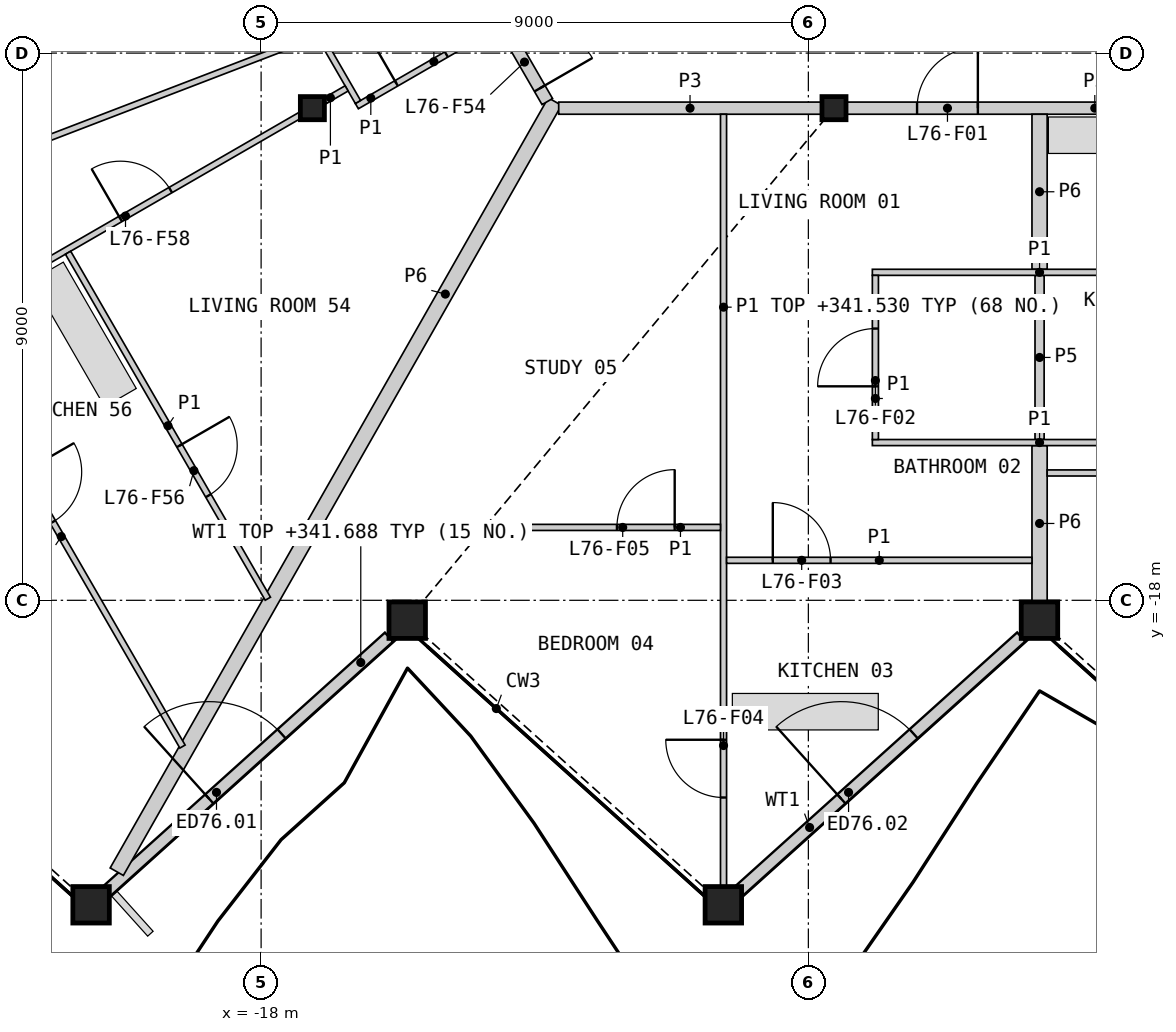
"""IFC4 building model, lengths in metres.
Left out: names, types, materials, properties, quantities, classifications, styles, units other than length and angle.
Written with IfcOpenShell. Run it as: python <this file> out.ifc"""

import sys

from ifc_helpers import new_model, si_unit, direction, frame, frame_2d, origin, origin_2d, place, context, subcontext, project, spatial, rectangle, hollow_rectangle, i_section, extrude, element, fill, save


model = new_model("IFC4")
c1 = context("Model", 3, precision=1e-05, world=origin(), true_north=direction((0.0, 1.0)))
c2 = subcontext(c1, "Body", "Model", "MODEL_VIEW")
j1 = project(units=[si_unit("LENGTHUNIT", "METRE"), si_unit("PLANEANGLEUNIT", "RADIAN")], contexts=[c1])
p1 = place(None, origin())
s1 = spatial("IfcSite", under=j1, at=p1, CompositionType="ELEMENT")
p2 = place(p1, origin())
s2 = spatial("IfcBuilding", under=s1, at=p2, CompositionType="ELEMENT")
p3 = place(p2, frame((0.0, 0.0, 339.2)))
s3 = spatial("IfcBuildingStorey", under=s2, at=p3, CompositionType="ELEMENT", Elevation=339.2)
for number, where, z_axis, x_axis in (
    (1, (-20.796, -23.008, 0.0), (0.0, 0.0, 1.0), (1.0, 0.0, 0.0)),
    (2, (-15.597, -18.327, 0.0), (0.0, 0.0, 1.0), (1.0, 0.0, 0.0)),
    (3, (-10.398, -23.008, 0.0), (0.0, 0.0, 1.0), (1.0, 0.0, 0.0)),
    (4, (-5.199, -18.327, 0.0), (0.0, 0.0, 1.0), (1.0, 0.0, 0.0)),
):
    element("IfcColumn", number, at=place(p3, frame(where, z_axis=z_axis, x_axis=x_axis)), inside=s3, PredefinedType="COLUMN", context=c2, shape_type="SweptSolid", body=[
        extrude(hollow_rectangle(XDim=0.6, YDim=0.6, WallThickness=0.04, at=origin_2d()), origin(), (0.0, 0.0, 1.0), 3.4),
    ])
for number, where, z_axis, x_axis in (
    (5, (-17.157, -9.906, 0.0), (0.0, 0.0, 1.0), (1.0, 0.0, 0.0)),
    (6, (-8.578, -9.906, 0.0), (0.0, 0.0, 1.0), (1.0, 0.0, 0.0)),
):
    element("IfcColumn", number, at=place(p3, frame(where, z_axis=z_axis, x_axis=x_axis)), inside=s3, PredefinedType="COLUMN", context=c2, shape_type="SweptSolid", body=[
        extrude(i_section(OverallWidth=0.396, OverallDepth=0.381, WebThickness=0.019, FlangeThickness=0.03, at=origin_2d()), origin(), (0.0, 0.0, 1.0), 3.4),
    ])
p4 = place(p3, frame((-20.534, -22.781, 0.0), z_axis=(0.0, 0.0, 1.0), x_axis=(0.743130709041, 0.669146283917, 0.0)))
e7 = element("IfcWall", 7, at=p4, inside=s3, PredefinedType="SOLIDWALL", context=c2, shape_type="SweptSolid", body=[
    extrude(rectangle(XDim=6.24, YDim=0.2, at=frame_2d((3.12, 0.0))), origin(), (0.0, 0.0, 1.0), 2.488),
])
p5 = place(p4, frame((2.263, 0.0, 0.0)))
e8 = element("IfcOpeningElement", 8, at=p5, cuts=e7, PredefinedType="OPENING", context=c2, shape_type="SweptSolid", body=[
    extrude(rectangle(XDim=1.6, YDim=2.25, at=frame_2d((0.8, 1.125))), frame((0.0, 0.11, 0.0), z_axis=(0.0, -1.0, 0.0), x_axis=(1.0, 0.0, 0.0)), (0.0, 0.0, 1.0), 0.22),
])
p6 = place(p3, frame((-10.139, -22.781, 0.0), z_axis=(0.0, 0.0, 1.0), x_axis=(0.743144430218, 0.669131045339, 0.0)))
e9 = element("IfcWall", 9, at=p6, inside=s3, PredefinedType="SOLIDWALL", context=c2, shape_type="SweptSolid", body=[
    extrude(rectangle(XDim=6.244, YDim=0.2, at=frame_2d((3.122, 0.0))), origin(), (0.0, 0.0, 1.0), 2.488),
])
p7 = place(p6, frame((2.263, 0.0, 0.0)))
e10 = element("IfcOpeningElement", 10, at=p7, cuts=e9, PredefinedType="OPENING", context=c2, shape_type="SweptSolid", body=[
    extrude(rectangle(XDim=1.6, YDim=2.25, at=frame_2d((0.8, 1.125))), frame((0.0, 0.11, 0.0), z_axis=(0.0, -1.0, 0.0), x_axis=(1.0, 0.0, 0.0)), (0.0, 0.0, 1.0), 0.22),
])
p8 = place(p3, frame((-20.374, -22.464, 0.0), z_axis=(0.0, 0.0, 1.0), x_axis=(0.494420378154, 0.869222922884, 0.0)))
e11 = element("IfcWall", 11, at=p8, inside=s3, PredefinedType="PARTITIONING", context=c2, shape_type="SweptSolid", body=[
    extrude(rectangle(XDim=14.573, YDim=0.25, at=frame_2d((7.286, 0.0))), origin(), (0.0, 0.0, 1.0), 2.33),
])
p9 = place(p3, frame((-8.371, -9.906, 0.0), z_axis=(0.0, 0.0, 1.0), x_axis=(1.0, 0.0, 0.0)))
e12 = element("IfcWall", 12, at=p9, inside=s3, PredefinedType="PARTITIONING", context=c2, shape_type="SweptSolid", body=[
    extrude(rectangle(XDim=8.163, YDim=0.2, at=frame_2d((4.082, 0.0))), origin(), (0.0, 0.0, 1.0), 3.1),
])
p10 = place(p9, frame((1.159, 0.0, 0.0)))
e13 = element("IfcOpeningElement", 13, at=p10, cuts=e12, PredefinedType="OPENING", context=c2, shape_type="SweptSolid", body=[
    extrude(rectangle(XDim=1.0, YDim=2.1, at=frame_2d((0.5, 1.05))), frame((0.0, 0.11, 0.0), z_axis=(0.0, -1.0, 0.0), x_axis=(1.0, 0.0, 0.0)), (0.0, 0.0, 1.0), 0.22),
])
p11 = place(p9, frame((6.327, 0.0, 0.0)))
e14 = element("IfcOpeningElement", 14, at=p11, cuts=e12, PredefinedType="OPENING", context=c2, shape_type="SweptSolid", body=[
    extrude(rectangle(XDim=1.0, YDim=2.1, at=frame_2d((0.5, 1.05))), frame((0.0, 0.11, 0.0), z_axis=(0.0, -1.0, 0.0), x_axis=(1.0, 0.0, 0.0)), (0.0, 0.0, 1.0), 0.22),
])
p12 = place(p3, frame((-13.106, -9.906, 0.0), z_axis=(0.0, 0.0, 1.0), x_axis=(1.0, 0.0, 0.0)))
e15 = element("IfcWall", 15, at=p12, inside=s3, PredefinedType="PARTITIONING", context=c2, shape_type="SweptSolid", body=[
    extrude(rectangle(XDim=4.32, YDim=0.2, at=frame_2d((2.16, 0.0))), origin(), (0.0, 0.0, 1.0), 3.1),
])
p13 = place(p3, frame((-15.131, -6.614, 0.0), z_axis=(0.0, 0.0, 1.0), x_axis=(0.499967746641, -0.866044024469, 0.0)))
e16 = element("IfcWall", 16, at=p13, inside=s3, PredefinedType="PARTITIONING", context=c2, shape_type="SweptSolid", body=[
    extrude(rectangle(XDim=3.676, YDim=0.2, at=frame_2d((1.838, 0.0))), origin(), (0.0, 0.0, 1.0), 3.1),
])
p14 = place(p13, frame((2.426, 0.0, 0.0)))
e17 = element("IfcOpeningElement", 17, at=p14, cuts=e16, PredefinedType="OPENING", context=c2, shape_type="SweptSolid", body=[
    extrude(rectangle(XDim=1.0, YDim=2.1, at=frame_2d((0.5, 1.05))), frame((0.0, 0.11, 0.0), z_axis=(0.0, -1.0, 0.0), x_axis=(1.0, 0.0, 0.0)), (0.0, 0.0, 1.0), 0.22),
])
p15 = place(p3, frame((-5.198, -12.556, 0.0), z_axis=(0.0, 0.0, 1.0), x_axis=(0.0, 1.0, 0.0)))
e18 = element("IfcWall", 18, at=p15, inside=s3, PredefinedType="PARTITIONING", context=c2, shape_type="SweptSolid", body=[
    extrude(rectangle(XDim=2.55, YDim=0.25, at=frame_2d((1.275, 0.0))), origin(), (0.0, 0.0, 1.0), 2.33),
])
p16 = place(p3, frame((-5.198, -18.017, 0.0), z_axis=(0.0, 0.0, 1.0), x_axis=(0.0, 1.0, 0.0)))
e19 = element("IfcWall", 19, at=p16, inside=s3, PredefinedType="PARTITIONING", context=c2, shape_type="SweptSolid", body=[
    extrude(rectangle(XDim=2.561, YDim=0.25, at=frame_2d((1.281, 0.0))), origin(), (0.0, 0.0, 1.0), 2.33),
])
p17 = place(p3, frame((-5.198, -15.356, 0.0), z_axis=(0.0, 0.0, 1.0), x_axis=(0.0, 1.0, 0.0)))
e20 = element("IfcWall", 20, at=p17, inside=s3, PredefinedType="PLUMBINGWALL", context=c2, shape_type="SweptSolid", body=[
    extrude(rectangle(XDim=2.7, YDim=0.15, at=frame_2d((1.35, 0.0))), origin(), (0.0, 0.0, 1.0), 2.33),
])
p18 = place(p3, frame((-10.395, -22.698, 0.0), z_axis=(0.0, 0.0, 1.0), x_axis=(0.0, 1.0, 0.0)))
e21 = element("IfcWall", 21, at=p18, inside=s3, PredefinedType="PARTITIONING", context=c2, shape_type="SweptSolid", body=[
    extrude(rectangle(XDim=12.692, YDim=0.1, at=frame_2d((6.346, 0.0))), origin(), (0.0, 0.0, 1.0), 2.33),
])
p19 = place(p18, frame((1.455, 0.0, 0.0)))
e22 = element("IfcOpeningElement", 22, at=p19, cuts=e21, PredefinedType="OPENING", context=c2, shape_type="SweptSolid", body=[
    extrude(rectangle(XDim=0.95, YDim=2.1, at=frame_2d((0.475, 1.05))), frame((0.0, 0.06, 0.0), z_axis=(0.0, -1.0, 0.0), x_axis=(1.0, 0.0, 0.0)), (0.0, 0.0, 1.0), 0.12),
])
p20 = place(p3, frame((-28.559, -13.11, 0.0), z_axis=(0.0, 0.0, 1.0), x_axis=(0.933581651686, 0.358364757802, 0.0)))
e23 = element("IfcWall", 23, at=p20, inside=s3, PredefinedType="PARTITIONING", context=c2, shape_type="SweptSolid", body=[
    extrude(rectangle(XDim=12.278, YDim=0.1, at=frame_2d((6.139, 0.0))), origin(), (0.0, 0.0, 1.0), 2.33),
])
p21 = place(p20, frame((5.564, 0.0, 0.0)))
e24 = element("IfcOpeningElement", 24, at=p21, cuts=e23, PredefinedType="OPENING", context=c2, shape_type="SweptSolid", body=[
    extrude(rectangle(XDim=0.95, YDim=2.1, at=frame_2d((0.475, 1.05))), frame((0.0, 0.06, 0.0), z_axis=(0.0, -1.0, 0.0), x_axis=(1.0, 0.0, 0.0)), (0.0, 0.0, 1.0), 0.12),
])
p22 = place(p3, frame((-27.122, -15.659, 0.0), z_axis=(0.0, 0.0, 1.0), x_axis=(0.866021046153, 0.500007547564, 0.0)))
e25 = element("IfcWall", 25, at=p22, inside=s3, PredefinedType="PARTITIONING", context=c2, shape_type="SweptSolid", body=[
    extrude(rectangle(XDim=11.267, YDim=0.1, at=frame_2d((5.634, 0.0))), origin(), (0.0, 0.0, 1.0), 2.33),
])
p23 = place(p22, frame((7.863, 0.0, 0.0)))
e26 = element("IfcOpeningElement", 26, at=p23, cuts=e25, PredefinedType="OPENING", context=c2, shape_type="SweptSolid", body=[
    extrude(rectangle(XDim=0.95, YDim=2.1, at=frame_2d((0.475, 1.05))), frame((0.0, 0.06, 0.0), z_axis=(0.0, -1.0, 0.0), x_axis=(1.0, 0.0, 0.0)), (0.0, 0.0, 1.0), 0.12),
])
p24 = place(p3, frame((-23.281, -13.499, 0.0), z_axis=(0.0, 0.0, 1.0), x_axis=(0.499994510044, -0.866028573389, 0.0)))
e27 = element("IfcWall", 27, at=p24, inside=s3, PredefinedType="PARTITIONING", context=c2, shape_type="SweptSolid", body=[
    extrude(rectangle(XDim=7.975, YDim=0.1, at=frame_2d((3.988, 0.0))), origin(), (0.0, 0.0, 1.0), 2.33),
])
p25 = place(p24, frame((2.76, 0.0, 0.0)))
e28 = element("IfcOpeningElement", 28, at=p25, cuts=e27, PredefinedType="OPENING", context=c2, shape_type="SweptSolid", body=[
    extrude(rectangle(XDim=0.95, YDim=2.1, at=frame_2d((0.475, 1.05))), frame((0.0, 0.06, 0.0), z_axis=(0.0, -1.0, 0.0), x_axis=(1.0, 0.0, 0.0)), (0.0, 0.0, 1.0), 0.12),
])
p26 = place(p3, frame((-17.028, -16.801, 0.0), z_axis=(0.0, 0.0, 1.0), x_axis=(1.0, 0.0, 0.0)))
e29 = element("IfcWall", 29, at=p26, inside=s3, PredefinedType="PARTITIONING", context=c2, shape_type="SweptSolid", body=[
    extrude(rectangle(XDim=6.583, YDim=0.1, at=frame_2d((3.292, 0.0))), origin(), (0.0, 0.0, 1.0), 2.33),
])
p27 = place(p26, frame((4.88, 0.0, 0.0)))
e30 = element("IfcOpeningElement", 30, at=p27, cuts=e29, PredefinedType="OPENING", context=c2, shape_type="SweptSolid", body=[
    extrude(rectangle(XDim=0.95, YDim=2.1, at=frame_2d((0.475, 1.05))), frame((0.0, 0.06, 0.0), z_axis=(0.0, -1.0, 0.0), x_axis=(1.0, 0.0, 0.0)), (0.0, 0.0, 1.0), 0.12),
])
p28 = place(p3, frame((-21.175, -12.283, 0.0), z_axis=(0.0, 0.0, 1.0), x_axis=(0.49999903102, -0.866025963225, 0.0)))
e31 = element("IfcWall", 31, at=p28, inside=s3, PredefinedType="PARTITIONING", context=c2, shape_type="SweptSolid", body=[
    extrude(rectangle(XDim=6.571, YDim=0.1, at=frame_2d((3.286, 0.0))), origin(), (0.0, 0.0, 1.0), 2.33),
])
p29 = place(p28, frame((3.664, 0.0, 0.0)))
e32 = element("IfcOpeningElement", 32, at=p29, cuts=e31, PredefinedType="OPENING", context=c2, shape_type="SweptSolid", body=[
    extrude(rectangle(XDim=0.95, YDim=2.1, at=frame_2d((0.475, 1.05))), frame((0.0, 0.06, 0.0), z_axis=(0.0, -1.0, 0.0), x_axis=(1.0, 0.0, 0.0)), (0.0, 0.0, 1.0), 0.12),
])
p30 = place(p3, frame((-7.948, -12.606, 0.0), z_axis=(0.0, 0.0, 1.0), x_axis=(1.0, 0.0, 0.0)))
e33 = element("IfcWall", 33, at=p30, inside=s3, PredefinedType="PARTITIONING", context=c2, shape_type="SweptSolid", body=[
    extrude(rectangle(XDim=5.5, YDim=0.1, at=frame_2d((2.75, 0.0))), origin(), (0.0, 0.0, 1.0), 2.33),
])
p31 = place(p3, frame((-7.948, -15.406, 0.0), z_axis=(0.0, 0.0, 1.0), x_axis=(1.0, 0.0, 0.0)))
e34 = element("IfcWall", 34, at=p31, inside=s3, PredefinedType="PARTITIONING", context=c2, shape_type="SweptSolid", body=[
    extrude(rectangle(XDim=5.5, YDim=0.1, at=frame_2d((2.75, 0.0))), origin(), (0.0, 0.0, 1.0), 2.33),
])
p32 = place(p31, frame((4.3, 0.0, 0.0)))
e35 = element("IfcOpeningElement", 35, at=p32, cuts=e34, PredefinedType="OPENING", context=c2, shape_type="SweptSolid", body=[
    extrude(rectangle(XDim=0.95, YDim=2.1, at=frame_2d((0.475, 1.05))), frame((0.0, 0.06, 0.0), z_axis=(0.0, -1.0, 0.0), x_axis=(1.0, 0.0, 0.0)), (0.0, 0.0, 1.0), 0.12),
])
p33 = place(p3, frame((-10.345, -17.342, 0.0), z_axis=(0.0, 0.0, 1.0), x_axis=(1.0, 0.0, 0.0)))
e36 = element("IfcWall", 36, at=p33, inside=s3, PredefinedType="PARTITIONING", context=c2, shape_type="SweptSolid", body=[
    extrude(rectangle(XDim=5.023, YDim=0.1, at=frame_2d((2.511, 0.0))), origin(), (0.0, 0.0, 1.0), 2.33),
])
p34 = place(p33, frame((0.76, 0.0, 0.0)))
e37 = element("IfcOpeningElement", 37, at=p34, cuts=e36, PredefinedType="OPENING", context=c2, shape_type="SweptSolid", body=[
    extrude(rectangle(XDim=0.95, YDim=2.1, at=frame_2d((0.475, 1.05))), frame((0.0, 0.06, 0.0), z_axis=(0.0, -1.0, 0.0), x_axis=(1.0, 0.0, 0.0)), (0.0, 0.0, 1.0), 0.12),
])
p35 = place(p3, frame((-5.073, -15.906, 0.0), z_axis=(0.0, 0.0, 1.0), x_axis=(1.0, 0.0, 0.0)))
e38 = element("IfcWall", 38, at=p35, inside=s3, PredefinedType="PARTITIONING", context=c2, shape_type="SweptSolid", body=[
    extrude(rectangle(XDim=2.825, YDim=0.1, at=frame_2d((1.413, 0.0))), origin(), (0.0, 0.0, 1.0), 2.33),
])
p36 = place(p3, frame((-7.897, -15.356, 0.0), z_axis=(0.0, 0.0, 1.0), x_axis=(0.0, 1.0, 0.0)))
e39 = element("IfcWall", 39, at=p36, inside=s3, PredefinedType="PARTITIONING", context=c2, shape_type="SweptSolid", body=[
    extrude(rectangle(XDim=2.7, YDim=0.1, at=frame_2d((1.35, 0.0))), origin(), (0.0, 0.0, 1.0), 2.33),
])
p37 = place(p36, frame((0.875, 0.0, 0.0)))
e40 = element("IfcOpeningElement", 40, at=p37, cuts=e39, PredefinedType="OPENING", context=c2, shape_type="SweptSolid", body=[
    extrude(rectangle(XDim=0.95, YDim=2.1, at=frame_2d((0.475, 1.05))), frame((0.0, 0.06, 0.0), z_axis=(0.0, -1.0, 0.0), x_axis=(1.0, 0.0, 0.0)), (0.0, 0.0, 1.0), 0.12),
])
p38 = place(p3, frame((-16.426, -9.872, 0.0), z_axis=(0.0, 0.0, 1.0), x_axis=(0.866029095148, 0.499993606316, 0.0)))
e41 = element("IfcWall", 41, at=p38, inside=s3, PredefinedType="PARTITIONING", context=c2, shape_type="SweptSolid", body=[
    extrude(rectangle(XDim=2.65, YDim=0.1, at=frame_2d((1.325, 0.0))), origin(), (0.0, 0.0, 1.0), 2.33),
])
p39 = place(p38, frame((0.75, 0.0, 0.0)))
e42 = element("IfcOpeningElement", 42, at=p39, cuts=e41, PredefinedType="OPENING", context=c2, shape_type="SweptSolid", body=[
    extrude(rectangle(XDim=0.95, YDim=2.1, at=frame_2d((0.475, 1.05))), frame((0.0, 0.06, 0.0), z_axis=(0.0, -1.0, 0.0), x_axis=(1.0, 0.0, 0.0)), (0.0, 0.0, 1.0), 0.12),
])
p40 = place(p3, frame((-17.507, -7.899, 0.0), z_axis=(0.0, 0.0, 1.0), x_axis=(0.499946605688, -0.86605622881, 0.0)))
e43 = element("IfcWall", 43, at=p40, inside=s3, PredefinedType="PARTITIONING", context=c2, shape_type="SweptSolid", body=[
    extrude(rectangle(XDim=2.2, YDim=0.1, at=frame_2d((1.1, 0.0))), origin(), (0.0, 0.0, 1.0), 2.33),
])
p41 = place(p3, frame((-16.949, -9.786, 0.0), z_axis=(0.0, 0.0, 1.0), x_axis=(0.866036909293, 0.499980071345, 0.0)))
e44 = element("IfcWall", 44, at=p41, inside=s3, PredefinedType="PARTITIONING", context=c2, shape_type="SweptSolid", body=[
    extrude(rectangle(XDim=0.41, YDim=0.1, at=frame_2d((0.205, 0.0))), origin(), (0.0, 0.0, 1.0), 2.33),
])
p42 = place(p5, origin())
e45 = element("IfcDoor", 45, at=p42, inside=s3, OperationType="DOUBLE_DOOR_SINGLE_SWING", PredefinedType="DOOR", context=c2, shape_type="SweptSolid", body=[
    extrude(rectangle(XDim=1.6, YDim=2.25, at=frame_2d((0.8, 1.125))), frame((0.0, 0.025, 0.0), z_axis=(0.0, -1.0, 0.0), x_axis=(1.0, 0.0, 0.0)), (0.0, 0.0, 1.0), 0.05),
])
fill(e8, e45)
p43 = place(p7, origin())
e46 = element("IfcDoor", 46, at=p43, inside=s3, OperationType="DOUBLE_DOOR_SINGLE_SWING", PredefinedType="DOOR", context=c2, shape_type="SweptSolid", body=[
    extrude(rectangle(XDim=1.6, YDim=2.25, at=frame_2d((0.8, 1.125))), frame((0.0, 0.025, 0.0), z_axis=(0.0, -1.0, 0.0), x_axis=(1.0, 0.0, 0.0)), (0.0, 0.0, 1.0), 0.05),
])
fill(e10, e46)
p44 = place(p10, origin())
e47 = element("IfcDoor", 47, at=p44, inside=s3, OperationType="SINGLE_SWING_RIGHT", PredefinedType="DOOR", context=c2, shape_type="SweptSolid", body=[
    extrude(rectangle(XDim=1.0, YDim=2.1, at=frame_2d((0.5, 1.05))), frame((0.0, 0.025, 0.0), z_axis=(0.0, -1.0, 0.0), x_axis=(1.0, 0.0, 0.0)), (0.0, 0.0, 1.0), 0.05),
])
fill(e13, e47)
p45 = place(p37, origin())
e48 = element("IfcDoor", 48, at=p45, inside=s3, OperationType="SINGLE_SWING_LEFT", PredefinedType="DOOR", context=c2, shape_type="SweptSolid", body=[
    extrude(rectangle(XDim=0.95, YDim=2.1, at=frame_2d((0.475, 1.05))), frame((0.0, 0.025, 0.0), z_axis=(0.0, -1.0, 0.0), x_axis=(1.0, 0.0, 0.0)), (0.0, 0.0, 1.0), 0.05),
])
fill(e40, e48)
p46 = place(p34, origin())
e49 = element("IfcDoor", 49, at=p46, inside=s3, OperationType="SINGLE_SWING_LEFT", PredefinedType="DOOR", context=c2, shape_type="SweptSolid", body=[
    extrude(rectangle(XDim=0.95, YDim=2.1, at=frame_2d((0.475, 1.05))), frame((0.0, 0.025, 0.0), z_axis=(0.0, -1.0, 0.0), x_axis=(1.0, 0.0, 0.0)), (0.0, 0.0, 1.0), 0.05),
])
fill(e37, e49)
p47 = place(p19, origin())
e50 = element("IfcDoor", 50, at=p47, inside=s3, OperationType="SINGLE_SWING_RIGHT", PredefinedType="DOOR", context=c2, shape_type="SweptSolid", body=[
    extrude(rectangle(XDim=0.95, YDim=2.1, at=frame_2d((0.475, 1.05))), frame((0.0, 0.025, 0.0), z_axis=(0.0, -1.0, 0.0), x_axis=(1.0, 0.0, 0.0)), (0.0, 0.0, 1.0), 0.05),
])
fill(e22, e50)
p48 = place(p27, origin())
e51 = element("IfcDoor", 51, at=p48, inside=s3, OperationType="SINGLE_SWING_RIGHT", PredefinedType="DOOR", context=c2, shape_type="SweptSolid", body=[
    extrude(rectangle(XDim=0.95, YDim=2.1, at=frame_2d((0.475, 1.05))), frame((0.0, 0.025, 0.0), z_axis=(0.0, -1.0, 0.0), x_axis=(1.0, 0.0, 0.0)), (0.0, 0.0, 1.0), 0.05),
])
fill(e30, e51)
p49 = place(p14, origin())
e52 = element("IfcDoor", 52, at=p49, inside=s3, OperationType="SINGLE_SWING_RIGHT", PredefinedType="DOOR", context=c2, shape_type="SweptSolid", body=[
    extrude(rectangle(XDim=1.0, YDim=2.1, at=frame_2d((0.5, 1.05))), frame((0.0, 0.025, 0.0), z_axis=(0.0, -1.0, 0.0), x_axis=(1.0, 0.0, 0.0)), (0.0, 0.0, 1.0), 0.05),
])
fill(e17, e52)
p50 = place(p39, origin())
e53 = element("IfcDoor", 53, at=p50, inside=s3, OperationType="SINGLE_SWING_LEFT", PredefinedType="DOOR", context=c2, shape_type="SweptSolid", body=[
    extrude(rectangle(XDim=0.95, YDim=2.1, at=frame_2d((0.475, 1.05))), frame((0.0, 0.025, 0.0), z_axis=(0.0, -1.0, 0.0), x_axis=(1.0, 0.0, 0.0)), (0.0, 0.0, 1.0), 0.05),
])
fill(e42, e53)
p51 = place(p29, origin())
e54 = element("IfcDoor", 54, at=p51, inside=s3, OperationType="SINGLE_SWING_LEFT", PredefinedType="DOOR", context=c2, shape_type="SweptSolid", body=[
    extrude(rectangle(XDim=0.95, YDim=2.1, at=frame_2d((0.475, 1.05))), frame((0.0, 0.025, 0.0), z_axis=(0.0, -1.0, 0.0), x_axis=(1.0, 0.0, 0.0)), (0.0, 0.0, 1.0), 0.05),
])
fill(e32, e54)
p52 = place(p25, origin())
e55 = element("IfcDoor", 55, at=p52, inside=s3, OperationType="SINGLE_SWING_LEFT", PredefinedType="DOOR", context=c2, shape_type="SweptSolid", body=[
    extrude(rectangle(XDim=0.95, YDim=2.1, at=frame_2d((0.475, 1.05))), frame((0.0, 0.025, 0.0), z_axis=(0.0, -1.0, 0.0), x_axis=(1.0, 0.0, 0.0)), (0.0, 0.0, 1.0), 0.05),
])
fill(e28, e55)
p53 = place(p23, origin())
e56 = element("IfcDoor", 56, at=p53, inside=s3, OperationType="SINGLE_SWING_LEFT", PredefinedType="DOOR", context=c2, shape_type="SweptSolid", body=[
    extrude(rectangle(XDim=0.95, YDim=2.1, at=frame_2d((0.475, 1.05))), frame((0.0, 0.025, 0.0), z_axis=(0.0, -1.0, 0.0), x_axis=(1.0, 0.0, 0.0)), (0.0, 0.0, 1.0), 0.05),
])
fill(e26, e56)
save(model, sys.argv[1])
